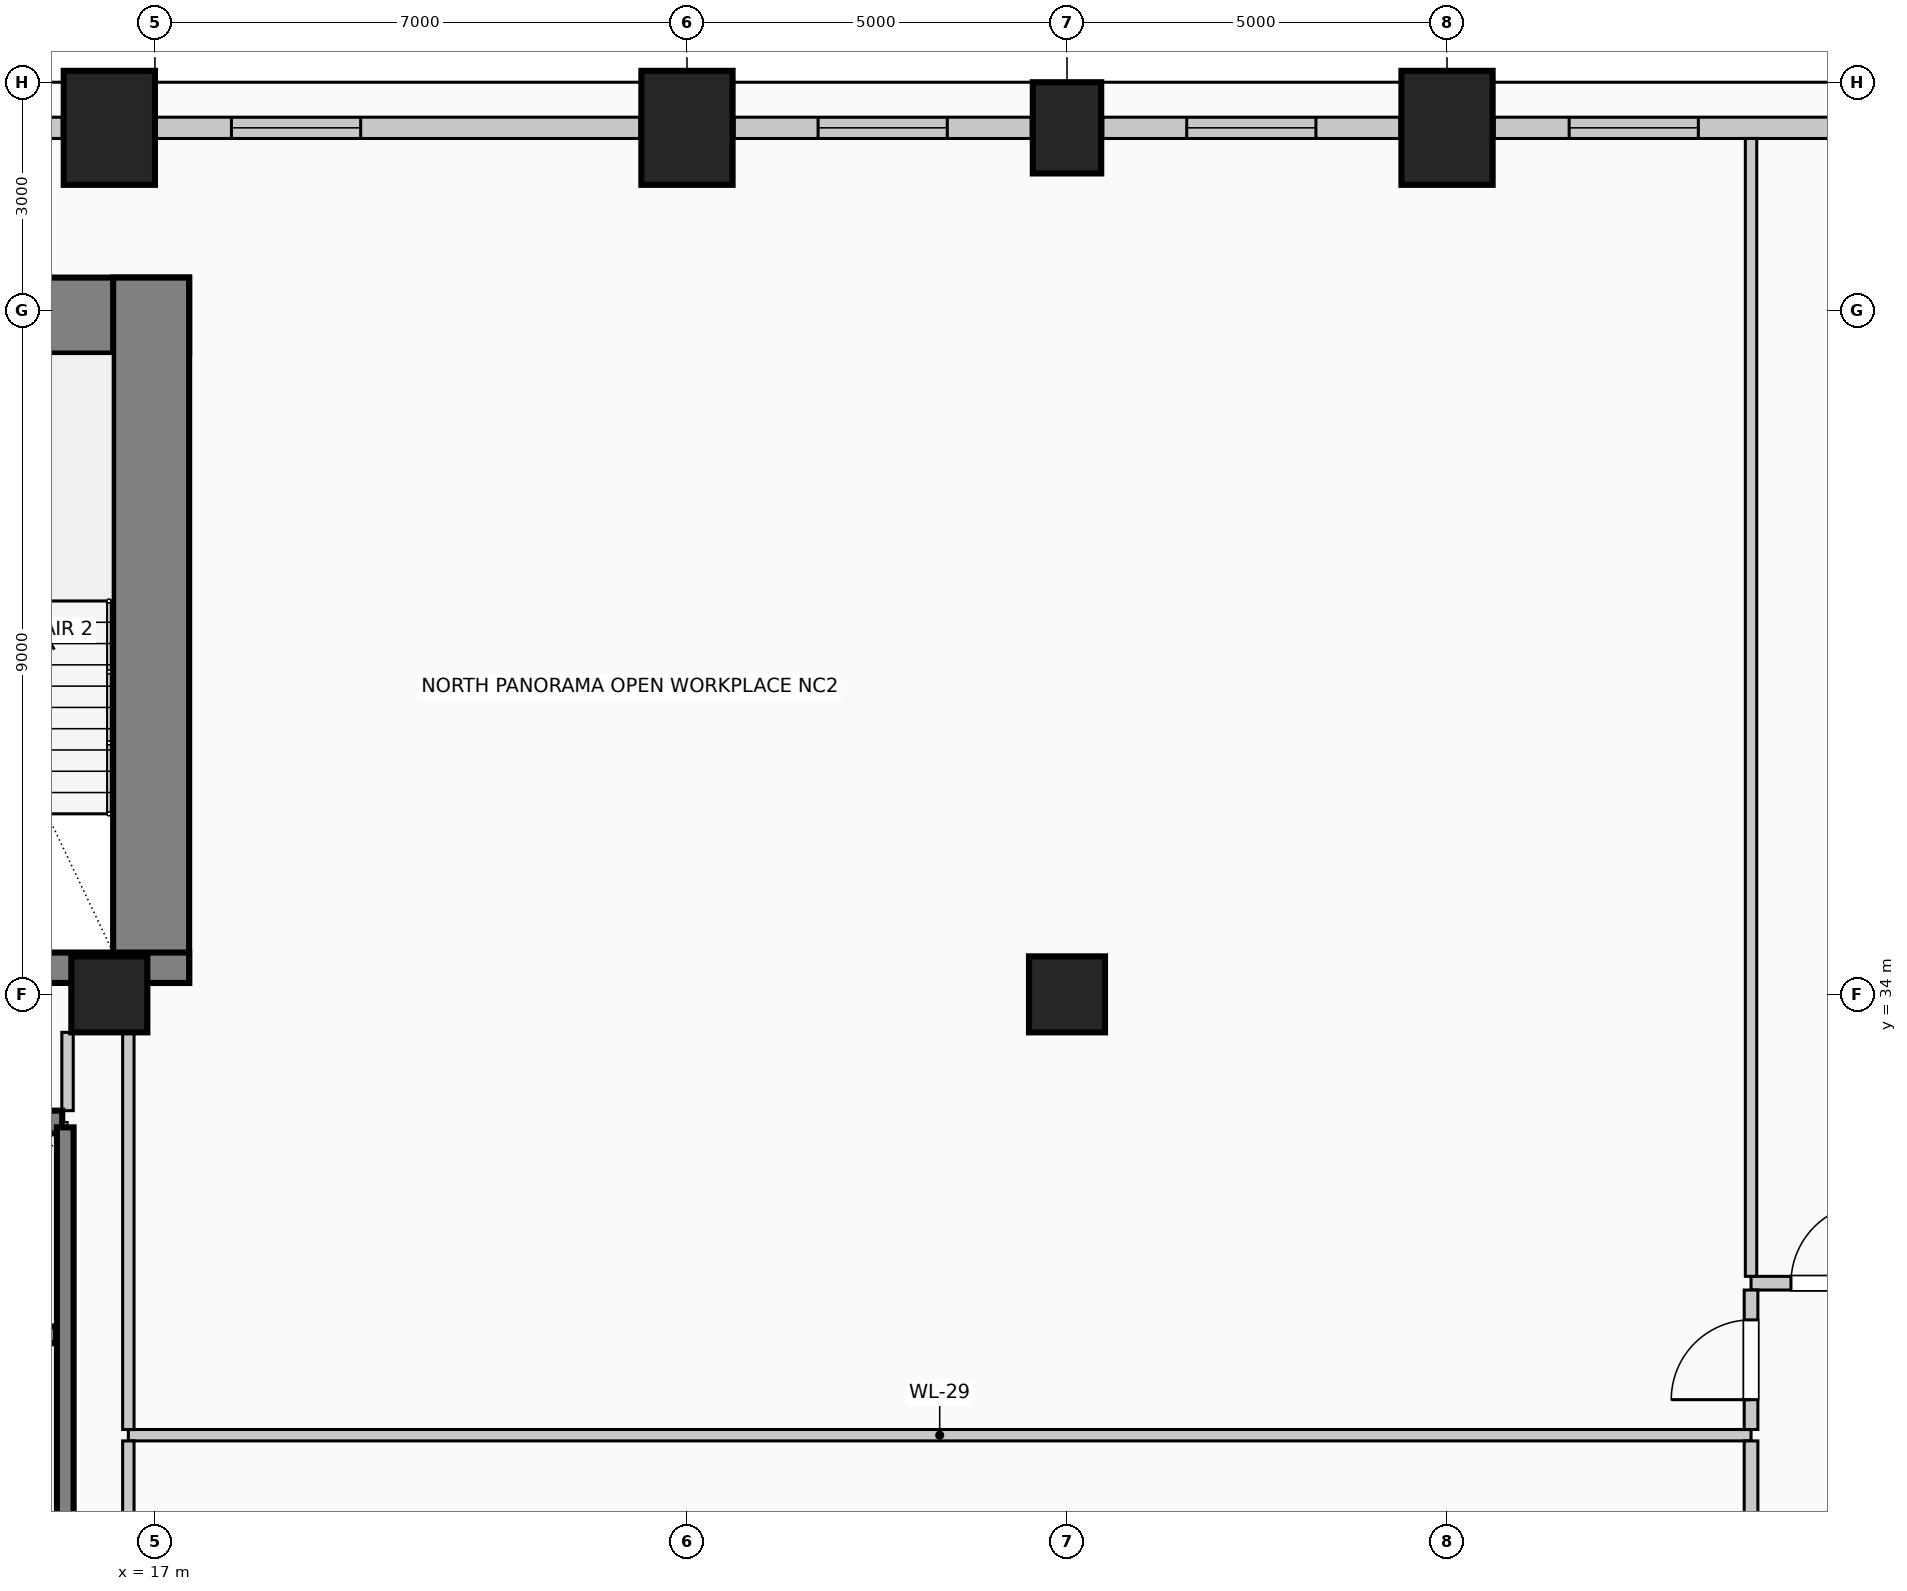
"""IFC4 building model, lengths in metres.
Left out: names, types, materials, properties, quantities, classifications, styles, units other than length and angle.
Written with IfcOpenShell. Run it as: python <this file> out.ifc"""

import sys

from ifc_helpers import new_model, si_unit, direction, frame, frame_2d, origin, origin_2d, place, context, subcontext, project, spatial, rectangle, circle, extrude, element, fill, save


model = new_model("IFC4")
c1 = context("Model", 3, precision=1e-05, world=origin(), true_north=direction((0.0, 1.0)))
c2 = subcontext(c1, "Body", "Model", "MODEL_VIEW")
j1 = project(units=[si_unit("LENGTHUNIT", "METRE"), si_unit("PLANEANGLEUNIT", "RADIAN")], contexts=[c1])
p1 = place(None, origin())
s1 = spatial("IfcSite", under=j1, at=p1, CompositionType="ELEMENT")
p2 = place(p1, origin())
s2 = spatial("IfcBuilding", under=s1, at=p2, CompositionType="ELEMENT")
p3 = place(p2, frame((0.0, 0.0, 70.6)))
s3 = spatial("IfcBuildingStorey", under=s2, at=p3, CompositionType="ELEMENT", Elevation=70.6)
p4 = place(p3, frame((2.55, 42.93, 0.0), z_axis=(0.0, 0.0, 1.0), x_axis=(1.0, 0.0, 0.0)))
e1 = element("IfcWall", 1, at=p4, inside=s3, PredefinedType="SHEAR", context=c2, shape_type="SweptSolid", body=[
    extrude(rectangle(XDim=14.9, YDim=1.0, at=frame_2d((7.45, 0.0))), origin(), (0.0, 0.0, 1.0), 4.0),
])
p5 = place(p3, frame((16.95, 34.15, 0.0), z_axis=(0.0, 0.0, 1.0), x_axis=(0.0, 1.0, 0.0)))
e2 = element("IfcWall", 2, at=p5, inside=s3, PredefinedType="SHEAR", context=c2, shape_type="SweptSolid", body=[
    extrude(rectangle(XDim=9.28, YDim=1.0, at=frame_2d((4.64, 0.0))), origin(), (0.0, 0.0, 1.0), 4.0),
])
p6 = place(p3, frame((12.29, 34.35, 0.0), z_axis=(0.0, 0.0, 1.0), x_axis=(1.0, 0.0, 0.0)))
e3 = element("IfcWall", 3, at=p6, inside=s3, PredefinedType="SHEAR", context=c2, shape_type="SweptSolid", body=[
    extrude(rectangle(XDim=5.16, YDim=0.4, at=frame_2d((2.58, 0.0))), origin(), (0.0, 0.0, 1.0), 4.0),
])
p7 = place(p6, frame((1.4, 0.0, 0.0)))
e4 = element("IfcOpeningElement", 4, at=p7, cuts=e3, PredefinedType="OPENING", context=c2, shape_type="SweptSolid", body=[
    extrude(rectangle(XDim=1.15, YDim=2.2, at=frame_2d((0.575, 1.1))), frame((0.0, 0.21, 0.0), z_axis=(0.0, -1.0, 0.0), x_axis=(1.0, 0.0, 0.0)), (0.0, 0.0, 1.0), 0.42),
])
for number, where, z_axis, x_axis in (
    (5, (16.4, 45.4, 0.0), (0.0, 0.0, 1.0), (1.0, 0.0, 0.0)),
    (6, (24.0, 45.4, 0.0), (0.0, 0.0, 1.0), (1.0, 0.0, 0.0)),
):
    element("IfcColumn", number, at=place(p3, frame(where, z_axis=z_axis, x_axis=x_axis)), inside=s3, PredefinedType="COLUMN", context=c2, shape_type="SweptSolid", body=[
        extrude(rectangle(XDim=1.2, YDim=1.5, at=origin_2d()), origin(), (0.0, 0.0, 1.0), 4.0),
    ])
p8 = place(p3, frame((29.0, 45.4, 0.0), z_axis=(0.0, 0.0, 1.0), x_axis=(1.0, 0.0, 0.0)))
e7 = element("IfcColumn", 7, at=p8, inside=s3, PredefinedType="COLUMN", context=c2, shape_type="SweptSolid", body=[
    extrude(rectangle(XDim=0.9, YDim=1.2, at=origin_2d()), origin(), (0.0, 0.0, 1.0), 4.0),
])
p9 = place(p3, frame((34.0, 45.4, 0.0), z_axis=(0.0, 0.0, 1.0), x_axis=(1.0, 0.0, 0.0)))
e8 = element("IfcColumn", 8, at=p9, inside=s3, PredefinedType="COLUMN", context=c2, shape_type="SweptSolid", body=[
    extrude(rectangle(XDim=1.2, YDim=1.5, at=origin_2d()), origin(), (0.0, 0.0, 1.0), 4.0),
])
for number, where, z_axis, x_axis in (
    (9, (16.4, 34.0, 0.0), (0.0, 0.0, 1.0), (1.0, 0.0, 0.0)),
    (10, (29.0, 34.0, 0.0), (0.0, 0.0, 1.0), (1.0, 0.0, 0.0)),
):
    element("IfcColumn", number, at=place(p3, frame(where, z_axis=z_axis, x_axis=x_axis)), inside=s3, PredefinedType="COLUMN", context=c2, shape_type="SweptSolid", body=[
        extrude(circle(Radius=0.5, at=origin_2d()), origin(), (0.0, 0.0, 1.0), 4.0),
    ])
p10 = place(p3, frame((14.47, 45.4, 0.0), z_axis=(0.0, 0.0, 1.0), x_axis=(1.0, 0.0, 0.0)))
e11 = element("IfcWall", 11, at=p10, inside=s3, PredefinedType="SOLIDWALL", context=c2, shape_type="SweptSolid", body=[
    extrude(rectangle(XDim=1.31, YDim=0.28, at=frame_2d((0.655, 0.0))), origin(), (0.0, 0.0, 1.0), 2.85),
])
p11 = place(p3, frame((17.02, 45.4, 0.0), z_axis=(0.0, 0.0, 1.0), x_axis=(1.0, 0.0, 0.0)))
e12 = element("IfcWall", 12, at=p11, inside=s3, PredefinedType="SOLIDWALL", context=c2, shape_type="SweptSolid", body=[
    extrude(rectangle(XDim=6.36, YDim=0.28, at=frame_2d((3.18, 0.0))), origin(), (0.0, 0.0, 1.0), 2.85),
])
p12 = place(p11, frame((0.987, 0.0, 0.5)))
e13 = element("IfcOpeningElement", 13, at=p12, cuts=e12, PredefinedType="OPENING", context=c2, shape_type="SweptSolid", body=[
    extrude(rectangle(XDim=1.7, YDim=1.95, at=frame_2d((0.85, 0.975))), frame((0.0, 0.15, 0.0), z_axis=(0.0, -1.0, 0.0), x_axis=(1.0, 0.0, 0.0)), (0.0, 0.0, 1.0), 0.3),
])
p13 = place(p3, frame((24.62, 45.4, 0.0), z_axis=(0.0, 0.0, 1.0), x_axis=(1.0, 0.0, 0.0)))
e14 = element("IfcWall", 14, at=p13, inside=s3, PredefinedType="SOLIDWALL", context=c2, shape_type="SweptSolid", body=[
    extrude(rectangle(XDim=3.91, YDim=0.28, at=frame_2d((1.955, 0.0))), origin(), (0.0, 0.0, 1.0), 2.85),
])
p14 = place(p13, frame((1.105, 0.0, 0.5)))
e15 = element("IfcOpeningElement", 15, at=p14, cuts=e14, PredefinedType="OPENING", context=c2, shape_type="SweptSolid", body=[
    extrude(rectangle(XDim=1.7, YDim=1.95, at=frame_2d((0.85, 0.975))), frame((0.0, 0.15, 0.0), z_axis=(0.0, -1.0, 0.0), x_axis=(1.0, 0.0, 0.0)), (0.0, 0.0, 1.0), 0.3),
])
p15 = place(p3, frame((29.47, 45.4, 0.0), z_axis=(0.0, 0.0, 1.0), x_axis=(1.0, 0.0, 0.0)))
e16 = element("IfcWall", 16, at=p15, inside=s3, PredefinedType="SOLIDWALL", context=c2, shape_type="SweptSolid", body=[
    extrude(rectangle(XDim=3.91, YDim=0.28, at=frame_2d((1.955, 0.0))), origin(), (0.0, 0.0, 1.0), 2.85),
])
p16 = place(p15, frame((1.105, 0.0, 0.5)))
e17 = element("IfcOpeningElement", 17, at=p16, cuts=e16, PredefinedType="OPENING", context=c2, shape_type="SweptSolid", body=[
    extrude(rectangle(XDim=1.7, YDim=1.95, at=frame_2d((0.85, 0.975))), frame((0.0, 0.15, 0.0), z_axis=(0.0, -1.0, 0.0), x_axis=(1.0, 0.0, 0.0)), (0.0, 0.0, 1.0), 0.3),
])
p17 = place(p3, frame((34.62, 45.4, 0.0), z_axis=(0.0, 0.0, 1.0), x_axis=(1.0, 0.0, 0.0)))
e18 = element("IfcWall", 18, at=p17, inside=s3, PredefinedType="SOLIDWALL", context=c2, shape_type="SweptSolid", body=[
    extrude(rectangle(XDim=6.36, YDim=0.28, at=frame_2d((3.18, 0.0))), origin(), (0.0, 0.0, 1.0), 2.85),
])
p18 = place(p17, frame((0.987, 0.0, 0.5)))
e19 = element("IfcOpeningElement", 19, at=p18, cuts=e18, PredefinedType="OPENING", context=c2, shape_type="SweptSolid", body=[
    extrude(rectangle(XDim=1.7, YDim=1.95, at=frame_2d((0.85, 0.975))), frame((0.0, 0.15, 0.0), z_axis=(0.0, -1.0, 0.0), x_axis=(1.0, 0.0, 0.0)), (0.0, 0.0, 1.0), 0.3),
])
p19 = place(p3, frame((14.0, 32.32, 0.0), z_axis=(0.0, 0.0, 1.0), x_axis=(1.0, 0.0, 0.0)))
e20 = element("IfcWall", 20, at=p19, inside=s3, PredefinedType="SOLIDWALL", context=c2, shape_type="SweptSolid", body=[
    extrude(rectangle(XDim=1.78, YDim=0.3, at=frame_2d((0.89, 0.0))), origin(), (0.0, 0.0, 1.0), 4.0),
])
p20 = place(p3, frame((15.82, 26.8, 0.0), z_axis=(0.0, 0.0, 1.0), x_axis=(0.0, 1.0, 0.0)))
e21 = element("IfcWall", 21, at=p20, inside=s3, PredefinedType="SOLIDWALL", context=c2, shape_type="SweptSolid", body=[
    extrude(rectangle(XDim=5.45, YDim=0.22, at=frame_2d((2.725, 0.0))), origin(), (0.0, 0.0, 1.0), 4.0),
])
p21 = place(p3, frame((12.3, 29.52, 0.0), z_axis=(0.0, 0.0, 1.0), x_axis=(1.0, 0.0, 0.0)))
e22 = element("IfcWall", 22, at=p21, inside=s3, PredefinedType="SOLIDWALL", context=c2, shape_type="SweptSolid", body=[
    extrude(rectangle(XDim=3.4, YDim=0.22, at=frame_2d((1.7, 0.0))), origin(), (0.0, 0.0, 1.0), 4.0),
])
p22 = place(p3, frame((16.65, 28.2, 0.0), z_axis=(0.0, 0.0, 1.0), x_axis=(1.0, 0.0, 0.0)))
e23 = element("IfcWall", 23, at=p22, inside=s3, PredefinedType="PARTITIONING", context=c2, shape_type="SweptSolid", body=[
    extrude(rectangle(XDim=21.35, YDim=0.15, at=frame_2d((10.675, 0.0))), origin(), (0.0, 0.0, 1.0), 3.7),
])
p23 = place(p3, frame((38.0, 30.2, 0.0), z_axis=(0.0, 0.0, 1.0), x_axis=(1.0, 0.0, 0.0)))
e24 = element("IfcWall", 24, at=p23, inside=s3, PredefinedType="PARTITIONING", context=c2, shape_type="SweptSolid", body=[
    extrude(rectangle(XDim=2.1, YDim=0.18, at=frame_2d((1.05, 0.0))), origin(), (0.0, 0.0, 1.0), 3.7),
])
p24 = place(p23, frame((0.525, 0.0, 0.0)))
e25 = element("IfcOpeningElement", 25, at=p24, cuts=e24, PredefinedType="OPENING", context=c2, shape_type="SweptSolid", body=[
    extrude(rectangle(XDim=1.05, YDim=2.15, at=frame_2d((0.525, 1.075))), frame((0.0, 0.1, 0.0), z_axis=(0.0, -1.0, 0.0), x_axis=(1.0, 0.0, 0.0)), (0.0, 0.0, 1.0), 0.2),
])
p25 = place(p3, frame((15.85, 32.47, 0.0), z_axis=(0.0, 0.0, 1.0), x_axis=(0.0, 1.0, 0.0)))
e26 = element("IfcWall", 26, at=p25, inside=s3, PredefinedType="PARTITIONING", context=c2, shape_type="SweptSolid", body=[
    extrude(rectangle(XDim=1.03, YDim=0.15, at=frame_2d((0.515, 0.0))), origin(), (0.0, 0.0, 1.0), 3.7),
])
p26 = place(p3, frame((16.65, 20.29, 0.0), z_axis=(0.0, 0.0, 1.0), x_axis=(0.0, 1.0, 0.0)))
e27 = element("IfcWall", 27, at=p26, inside=s3, PredefinedType="PARTITIONING", context=c2, shape_type="SweptSolid", body=[
    extrude(rectangle(XDim=7.835, YDim=0.15, at=frame_2d((3.917, 0.0))), origin(), (0.0, 0.0, 1.0), 2.995),
])
p27 = place(p3, frame((16.65, 28.275, 0.0), z_axis=(0.0, 0.0, 1.0), x_axis=(0.0, 1.0, 0.0)))
e28 = element("IfcWall", 28, at=p27, inside=s3, PredefinedType="PARTITIONING", context=c2, shape_type="SweptSolid", body=[
    extrude(rectangle(XDim=5.225, YDim=0.15, at=frame_2d((2.613, 0.0))), origin(), (0.0, 0.0, 1.0), 2.995),
])
p28 = place(p3, frame((38.0, 20.29, 0.0), z_axis=(0.0, 0.0, 1.0), x_axis=(0.0, 1.0, 0.0)))
e29 = element("IfcWall", 29, at=p28, inside=s3, PredefinedType="PARTITIONING", context=c2, shape_type="SweptSolid", body=[
    extrude(rectangle(XDim=7.835, YDim=0.18, at=frame_2d((3.917, 0.0))), origin(), (0.0, 0.0, 1.0), 3.7),
])
p29 = place(p3, frame((38.0, 28.275, 0.0), z_axis=(0.0, 0.0, 1.0), x_axis=(0.0, 1.0, 0.0)))
e30 = element("IfcWall", 30, at=p29, inside=s3, PredefinedType="PARTITIONING", context=c2, shape_type="SweptSolid", body=[
    extrude(rectangle(XDim=1.835, YDim=0.18, at=frame_2d((0.917, 0.0))), origin(), (0.0, 0.0, 1.0), 3.7),
])
p30 = place(p29, frame((0.393, 0.0, 0.0)))
e31 = element("IfcOpeningElement", 31, at=p30, cuts=e30, PredefinedType="OPENING", context=c2, shape_type="SweptSolid", body=[
    extrude(rectangle(XDim=1.05, YDim=2.15, at=frame_2d((0.525, 1.075))), frame((0.0, 0.1, 0.0), z_axis=(0.0, -1.0, 0.0), x_axis=(1.0, 0.0, 0.0)), (0.0, 0.0, 1.0), 0.2),
])
p31 = place(p3, frame((38.0, 30.29, 0.0), z_axis=(0.0, 0.0, 1.0), x_axis=(0.0, 1.0, 0.0)))
e32 = element("IfcWall", 32, at=p31, inside=s3, PredefinedType="PARTITIONING", context=c2, shape_type="SweptSolid", body=[
    extrude(rectangle(XDim=14.97, YDim=0.15, at=frame_2d((7.485, 0.0))), origin(), (0.0, 0.0, 1.0), 3.7),
])
p32 = place(p12, origin())
e33 = element("IfcWindow", 33, at=p32, inside=s3, PartitioningType="SINGLE_PANEL", PredefinedType="WINDOW", context=c2, shape_type="SweptSolid", body=[
    extrude(rectangle(XDim=1.7, YDim=1.95, at=frame_2d((0.85, 0.975))), frame((0.0, 0.03, 0.0), z_axis=(0.0, -1.0, 0.0), x_axis=(1.0, 0.0, 0.0)), (0.0, 0.0, 1.0), 0.06),
])
fill(e13, e33)
p33 = place(p14, origin())
e34 = element("IfcWindow", 34, at=p33, inside=s3, PartitioningType="SINGLE_PANEL", PredefinedType="WINDOW", context=c2, shape_type="SweptSolid", body=[
    extrude(rectangle(XDim=1.7, YDim=1.95, at=frame_2d((0.85, 0.975))), frame((0.0, 0.03, 0.0), z_axis=(0.0, -1.0, 0.0), x_axis=(1.0, 0.0, 0.0)), (0.0, 0.0, 1.0), 0.06),
])
fill(e15, e34)
p34 = place(p16, origin())
e35 = element("IfcWindow", 35, at=p34, inside=s3, PartitioningType="SINGLE_PANEL", PredefinedType="WINDOW", context=c2, shape_type="SweptSolid", body=[
    extrude(rectangle(XDim=1.7, YDim=1.95, at=frame_2d((0.85, 0.975))), frame((0.0, 0.03, 0.0), z_axis=(0.0, -1.0, 0.0), x_axis=(1.0, 0.0, 0.0)), (0.0, 0.0, 1.0), 0.06),
])
fill(e17, e35)
p35 = place(p18, origin())
e36 = element("IfcWindow", 36, at=p35, inside=s3, PartitioningType="SINGLE_PANEL", PredefinedType="WINDOW", context=c2, shape_type="SweptSolid", body=[
    extrude(rectangle(XDim=1.7, YDim=1.95, at=frame_2d((0.85, 0.975))), frame((0.0, 0.03, 0.0), z_axis=(0.0, -1.0, 0.0), x_axis=(1.0, 0.0, 0.0)), (0.0, 0.0, 1.0), 0.06),
])
fill(e19, e36)
p36 = place(p24, origin())
e37 = element("IfcDoor", 37, at=p36, inside=s3, OperationType="SINGLE_SWING_RIGHT", PredefinedType="DOOR", context=c2, shape_type="SweptSolid", body=[
    extrude(rectangle(XDim=1.05, YDim=2.15, at=frame_2d((0.525, 1.075))), frame((0.0, 0.025, 0.0), z_axis=(0.0, -1.0, 0.0), x_axis=(1.0, 0.0, 0.0)), (0.0, 0.0, 1.0), 0.05),
])
fill(e25, e37)
p37 = place(p30, origin())
e38 = element("IfcDoor", 38, at=p37, inside=s3, OperationType="SINGLE_SWING_LEFT", PredefinedType="DOOR", context=c2, shape_type="SweptSolid", body=[
    extrude(rectangle(XDim=1.05, YDim=2.15, at=frame_2d((0.525, 1.075))), frame((0.0, 0.025, 0.0), z_axis=(0.0, -1.0, 0.0), x_axis=(1.0, 0.0, 0.0)), (0.0, 0.0, 1.0), 0.05),
])
fill(e31, e38)
save(model, sys.argv[1])
